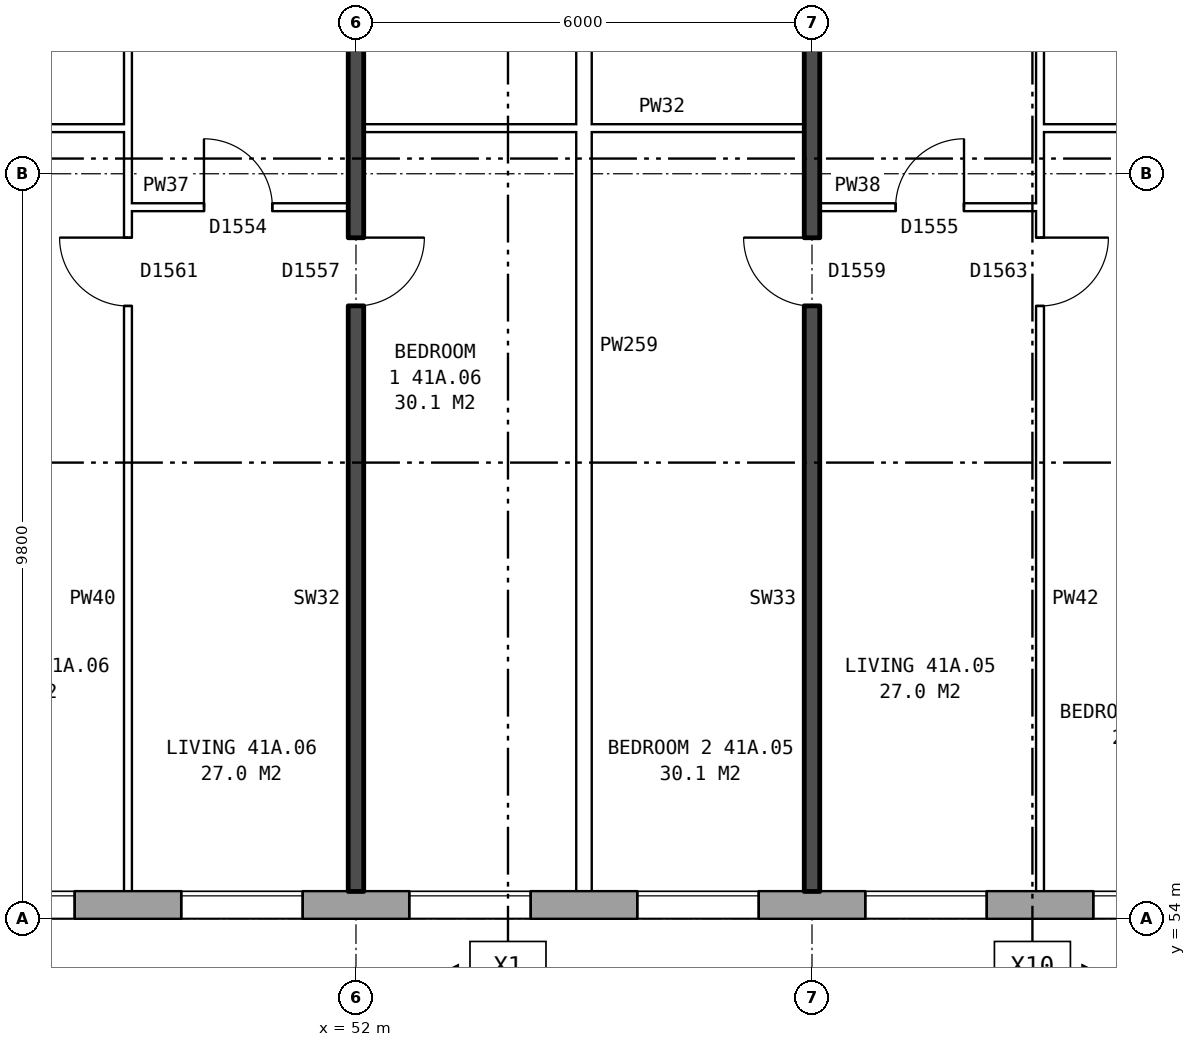
"""IFC4 building model, lengths in metres.
Left out: names, types, materials, properties, quantities, classifications, styles, units other than length and angle.
Written with IfcOpenShell. Run it as: python <this file> out.ifc"""

import sys

from ifc_helpers import new_model, si_unit, direction, frame, frame_2d, origin, place, context, subcontext, project, spatial, rectangle, extrude, element, fill, save


model = new_model("IFC4")
c1 = context("Model", 3, precision=1e-05, world=origin(), true_north=direction((0.0, 1.0)))
c2 = subcontext(c1, "Body", "Model", "MODEL_VIEW")
j1 = project(units=[si_unit("LENGTHUNIT", "METRE"), si_unit("PLANEANGLEUNIT", "RADIAN")], contexts=[c1])
p1 = place(None, origin())
s1 = spatial("IfcSite", under=j1, at=p1, CompositionType="ELEMENT")
p2 = place(p1, origin())
s2 = spatial("IfcBuilding", under=s1, at=p2, CompositionType="ELEMENT")
p3 = place(p2, frame((0.0, 0.0, 148.5)))
s3 = spatial("IfcBuildingStorey", under=s2, at=p3, CompositionType="ELEMENT", Elevation=148.5)
p4 = place(p3, frame((31.575, 54.18, 0.0), z_axis=(0.0, 0.0, 1.0), x_axis=(1.0, 0.0, 0.0)))
e1 = element("IfcWall", 1, at=p4, inside=s3, PredefinedType="STANDARD", context=c2, shape_type="SweptSolid", body=[
    extrude(rectangle(XDim=41.351, YDim=0.36, at=frame_2d((20.675, 0.0))), origin(), (0.0, 0.0, 1.0), 2.85),
])
p5 = place(p4, frame((3.125, 0.0, 0.8)))
e2 = element("IfcOpeningElement", 2, at=p5, cuts=e1, PredefinedType="OPENING", context=c2, shape_type="SweptSolid", body=[
    extrude(rectangle(XDim=1.6, YDim=1.8, at=frame_2d((0.8, 0.9))), frame((0.0, 0.19, 0.0), z_axis=(0.0, -1.0, 0.0), x_axis=(1.0, 0.0, 0.0)), (0.0, 0.0, 1.0), 0.38),
])
p6 = place(p4, frame((6.125, 0.0, 0.8)))
e3 = element("IfcOpeningElement", 3, at=p6, cuts=e1, PredefinedType="OPENING", context=c2, shape_type="SweptSolid", body=[
    extrude(rectangle(XDim=1.6, YDim=1.8, at=frame_2d((0.8, 0.9))), frame((0.0, 0.19, 0.0), z_axis=(0.0, -1.0, 0.0), x_axis=(1.0, 0.0, 0.0)), (0.0, 0.0, 1.0), 0.38),
])
p7 = place(p4, frame((9.125, 0.0, 0.8)))
e4 = element("IfcOpeningElement", 4, at=p7, cuts=e1, PredefinedType="OPENING", context=c2, shape_type="SweptSolid", body=[
    extrude(rectangle(XDim=1.6, YDim=1.8, at=frame_2d((0.8, 0.9))), frame((0.0, 0.19, 0.0), z_axis=(0.0, -1.0, 0.0), x_axis=(1.0, 0.0, 0.0)), (0.0, 0.0, 1.0), 0.38),
])
p8 = place(p4, frame((12.125, 0.0, 0.8)))
e5 = element("IfcOpeningElement", 5, at=p8, cuts=e1, PredefinedType="OPENING", context=c2, shape_type="SweptSolid", body=[
    extrude(rectangle(XDim=1.6, YDim=1.8, at=frame_2d((0.8, 0.9))), frame((0.0, 0.19, 0.0), z_axis=(0.0, -1.0, 0.0), x_axis=(1.0, 0.0, 0.0)), (0.0, 0.0, 1.0), 0.38),
])
p9 = place(p4, frame((15.125, 0.0, 0.8)))
e6 = element("IfcOpeningElement", 6, at=p9, cuts=e1, PredefinedType="OPENING", context=c2, shape_type="SweptSolid", body=[
    extrude(rectangle(XDim=1.6, YDim=1.8, at=frame_2d((0.8, 0.9))), frame((0.0, 0.19, 0.0), z_axis=(0.0, -1.0, 0.0), x_axis=(1.0, 0.0, 0.0)), (0.0, 0.0, 1.0), 0.38),
])
p10 = place(p4, frame((18.125, 0.0, 0.8)))
e7 = element("IfcOpeningElement", 7, at=p10, cuts=e1, PredefinedType="OPENING", context=c2, shape_type="SweptSolid", body=[
    extrude(rectangle(XDim=1.6, YDim=1.8, at=frame_2d((0.8, 0.9))), frame((0.0, 0.19, 0.0), z_axis=(0.0, -1.0, 0.0), x_axis=(1.0, 0.0, 0.0)), (0.0, 0.0, 1.0), 0.38),
])
p11 = place(p4, frame((21.125, 0.0, 0.8)))
e8 = element("IfcOpeningElement", 8, at=p11, cuts=e1, PredefinedType="OPENING", context=c2, shape_type="SweptSolid", body=[
    extrude(rectangle(XDim=1.6, YDim=1.8, at=frame_2d((0.8, 0.9))), frame((0.0, 0.19, 0.0), z_axis=(0.0, -1.0, 0.0), x_axis=(1.0, 0.0, 0.0)), (0.0, 0.0, 1.0), 0.38),
])
p12 = place(p4, frame((24.125, 0.0, 0.8)))
e9 = element("IfcOpeningElement", 9, at=p12, cuts=e1, PredefinedType="OPENING", context=c2, shape_type="SweptSolid", body=[
    extrude(rectangle(XDim=1.6, YDim=1.8, at=frame_2d((0.8, 0.9))), frame((0.0, 0.19, 0.0), z_axis=(0.0, -1.0, 0.0), x_axis=(1.0, 0.0, 0.0)), (0.0, 0.0, 1.0), 0.38),
])
p13 = place(p4, frame((27.125, 0.0, 0.8)))
e10 = element("IfcOpeningElement", 10, at=p13, cuts=e1, PredefinedType="OPENING", context=c2, shape_type="SweptSolid", body=[
    extrude(rectangle(XDim=1.6, YDim=1.8, at=frame_2d((0.8, 0.9))), frame((0.0, 0.19, 0.0), z_axis=(0.0, -1.0, 0.0), x_axis=(1.0, 0.0, 0.0)), (0.0, 0.0, 1.0), 0.38),
])
p14 = place(p4, frame((30.125, 0.0, 0.8)))
e11 = element("IfcOpeningElement", 11, at=p14, cuts=e1, PredefinedType="OPENING", context=c2, shape_type="SweptSolid", body=[
    extrude(rectangle(XDim=1.6, YDim=1.8, at=frame_2d((0.8, 0.9))), frame((0.0, 0.19, 0.0), z_axis=(0.0, -1.0, 0.0), x_axis=(1.0, 0.0, 0.0)), (0.0, 0.0, 1.0), 0.38),
])
p15 = place(p4, frame((33.125, 0.0, 0.8)))
e12 = element("IfcOpeningElement", 12, at=p15, cuts=e1, PredefinedType="OPENING", context=c2, shape_type="SweptSolid", body=[
    extrude(rectangle(XDim=1.6, YDim=1.8, at=frame_2d((0.8, 0.9))), frame((0.0, 0.19, 0.0), z_axis=(0.0, -1.0, 0.0), x_axis=(1.0, 0.0, 0.0)), (0.0, 0.0, 1.0), 0.38),
])
p16 = place(p4, frame((36.125, 0.0, 0.8)))
e13 = element("IfcOpeningElement", 13, at=p16, cuts=e1, PredefinedType="OPENING", context=c2, shape_type="SweptSolid", body=[
    extrude(rectangle(XDim=1.6, YDim=1.8, at=frame_2d((0.8, 0.9))), frame((0.0, 0.19, 0.0), z_axis=(0.0, -1.0, 0.0), x_axis=(1.0, 0.0, 0.0)), (0.0, 0.0, 1.0), 0.38),
])
p17 = place(p4, frame((38.625, 0.0, 0.8)))
e14 = element("IfcOpeningElement", 14, at=p17, cuts=e1, PredefinedType="OPENING", context=c2, shape_type="SweptSolid", body=[
    extrude(rectangle(XDim=1.2, YDim=1.8, at=frame_2d((0.6, 0.9))), frame((0.0, 0.19, 0.0), z_axis=(0.0, -1.0, 0.0), x_axis=(1.0, 0.0, 0.0)), (0.0, 0.0, 1.0), 0.38),
])
p18 = place(p4, frame((40.125, 0.0, 0.8)))
e15 = element("IfcOpeningElement", 15, at=p18, cuts=e1, PredefinedType="OPENING", context=c2, shape_type="SweptSolid", body=[
    extrude(rectangle(XDim=0.8, YDim=0.9, at=frame_2d((0.4, 0.45))), frame((0.0, 0.19, 0.0), z_axis=(0.0, -1.0, 0.0), x_axis=(1.0, 0.0, 0.0)), (0.0, 0.0, 1.0), 0.38),
])
p19 = place(p3, frame((49.0, 63.36, 0.0), z_axis=(0.0, 0.0, 1.0), x_axis=(1.0, 0.0, 0.0)))
e16 = element("IfcWall", 16, at=p19, inside=s3, PredefinedType="PARTITIONING", context=c2, shape_type="SweptSolid", body=[
    extrude(rectangle(XDim=2.9, YDim=0.1, at=frame_2d((1.45, 0.0))), origin(), (0.0, 0.0, 1.0), 2.85),
])
p20 = place(p19, frame((1.0, 0.0, 0.0)))
e17 = element("IfcOpeningElement", 17, at=p20, cuts=e16, PredefinedType="OPENING", context=c2, shape_type="SweptSolid", body=[
    extrude(rectangle(XDim=0.9, YDim=2.1, at=frame_2d((0.45, 1.05))), frame((0.0, 0.06, 0.0), z_axis=(0.0, -1.0, 0.0), x_axis=(1.0, 0.0, 0.0)), (0.0, 0.0, 1.0), 0.12),
])
p21 = place(p3, frame((58.1, 63.36, 0.0), z_axis=(0.0, 0.0, 1.0), x_axis=(1.0, 0.0, 0.0)))
e18 = element("IfcWall", 18, at=p21, inside=s3, PredefinedType="PARTITIONING", context=c2, shape_type="SweptSolid", body=[
    extrude(rectangle(XDim=2.9, YDim=0.1, at=frame_2d((1.45, 0.0))), origin(), (0.0, 0.0, 1.0), 2.85),
])
p22 = place(p21, frame((1.0, 0.0, 0.0)))
e19 = element("IfcOpeningElement", 19, at=p22, cuts=e18, PredefinedType="OPENING", context=c2, shape_type="SweptSolid", body=[
    extrude(rectangle(XDim=0.9, YDim=2.1, at=frame_2d((0.45, 1.05))), frame((0.0, 0.06, 0.0), z_axis=(0.0, -1.0, 0.0), x_axis=(1.0, 0.0, 0.0)), (0.0, 0.0, 1.0), 0.12),
])
p23 = place(p3, frame((46.1, 64.4, 0.0), z_axis=(0.0, 0.0, 1.0), x_axis=(1.0, 0.0, 0.0)))
e20 = element("IfcWall", 20, at=p23, inside=s3, PredefinedType="PARTITIONING", context=c2, shape_type="SweptSolid", body=[
    extrude(rectangle(XDim=2.9, YDim=0.1, at=frame_2d((1.45, 0.0))), origin(), (0.0, 0.0, 1.0), 2.85),
])
p24 = place(p3, frame((52.1, 64.4, 0.0), z_axis=(0.0, 0.0, 1.0), x_axis=(1.0, 0.0, 0.0)))
e21 = element("IfcWall", 21, at=p24, inside=s3, PredefinedType="PARTITIONING", context=c2, shape_type="SweptSolid", body=[
    extrude(rectangle(XDim=5.8, YDim=0.1, at=frame_2d((2.9, 0.0))), origin(), (0.0, 0.0, 1.0), 2.85),
])
p25 = place(p3, frame((61.0, 64.4, 0.0), z_axis=(0.0, 0.0, 1.0), x_axis=(1.0, 0.0, 0.0)))
e22 = element("IfcWall", 22, at=p25, inside=s3, PredefinedType="PARTITIONING", context=c2, shape_type="SweptSolid", body=[
    extrude(rectangle(XDim=2.64, YDim=0.1, at=frame_2d((1.32, 0.0))), origin(), (0.0, 0.0, 1.0), 2.85),
])
p26 = place(p3, frame((49.0, 54.36, 0.0), z_axis=(0.0, 0.0, 1.0), x_axis=(0.0, 1.0, 0.0)))
e23 = element("IfcWall", 23, at=p26, inside=s3, PredefinedType="PARTITIONING", context=c2, shape_type="SweptSolid", body=[
    extrude(rectangle(XDim=14.34, YDim=0.1, at=frame_2d((7.17, 0.0))), origin(), (0.0, 0.0, 1.0), 2.85),
])
p27 = place(p26, frame((7.7, 0.0, 0.0)))
e24 = element("IfcOpeningElement", 24, at=p27, cuts=e23, PredefinedType="OPENING", context=c2, shape_type="SweptSolid", body=[
    extrude(rectangle(XDim=0.9, YDim=2.1, at=frame_2d((0.45, 1.05))), frame((0.0, 0.06, 0.0), z_axis=(0.0, -1.0, 0.0), x_axis=(1.0, 0.0, 0.0)), (0.0, 0.0, 1.0), 0.12),
])
p28 = place(p26, frame((13.04, 0.0, 0.0)))
e25 = element("IfcOpeningElement", 25, at=p28, cuts=e23, PredefinedType="OPENING", context=c2, shape_type="SweptSolid", body=[
    extrude(rectangle(XDim=0.9, YDim=2.1, at=frame_2d((0.45, 1.05))), frame((0.0, 0.06, 0.0), z_axis=(0.0, -1.0, 0.0), x_axis=(1.0, 0.0, 0.0)), (0.0, 0.0, 1.0), 0.12),
])
p29 = place(p3, frame((52.0, 54.36, 0.0), z_axis=(0.0, 0.0, 1.0), x_axis=(0.0, 1.0, 0.0)))
e26 = element("IfcWall", 26, at=p29, inside=s3, PredefinedType="SOLIDWALL", context=c2, shape_type="SweptSolid", body=[
    extrude(rectangle(XDim=14.44, YDim=0.2, at=frame_2d((7.22, 0.0))), origin(), (0.0, 0.0, 1.0), 2.85),
])
p30 = place(p29, frame((7.7, 0.0, 0.0)))
e27 = element("IfcOpeningElement", 27, at=p30, cuts=e26, PredefinedType="OPENING", context=c2, shape_type="SweptSolid", body=[
    extrude(rectangle(XDim=0.9, YDim=2.1, at=frame_2d((0.45, 1.05))), frame((0.0, 0.11, 0.0), z_axis=(0.0, -1.0, 0.0), x_axis=(1.0, 0.0, 0.0)), (0.0, 0.0, 1.0), 0.22),
])
p31 = place(p29, frame((13.14, 0.0, 0.0)))
e28 = element("IfcOpeningElement", 28, at=p31, cuts=e26, PredefinedType="OPENING", context=c2, shape_type="SweptSolid", body=[
    extrude(rectangle(XDim=0.9, YDim=2.1, at=frame_2d((0.45, 1.05))), frame((0.0, 0.11, 0.0), z_axis=(0.0, -1.0, 0.0), x_axis=(1.0, 0.0, 0.0)), (0.0, 0.0, 1.0), 0.22),
])
p32 = place(p3, frame((55.0, 54.36, 0.0), z_axis=(0.0, 0.0, 1.0), x_axis=(0.0, 1.0, 0.0)))
e29 = element("IfcWall", 29, at=p32, inside=s3, PredefinedType="PARTITIONING", context=c2, shape_type="SweptSolid", body=[
    extrude(rectangle(XDim=14.34, YDim=0.2, at=frame_2d((7.17, 0.0))), origin(), (0.0, 0.0, 1.0), 2.85),
])
p33 = place(p3, frame((58.0, 54.36, 0.0), z_axis=(0.0, 0.0, 1.0), x_axis=(0.0, 1.0, 0.0)))
e30 = element("IfcWall", 30, at=p33, inside=s3, PredefinedType="SOLIDWALL", context=c2, shape_type="SweptSolid", body=[
    extrude(rectangle(XDim=14.44, YDim=0.2, at=frame_2d((7.22, 0.0))), origin(), (0.0, 0.0, 1.0), 2.85),
])
p34 = place(p33, frame((7.7, 0.0, 0.0)))
e31 = element("IfcOpeningElement", 31, at=p34, cuts=e30, PredefinedType="OPENING", context=c2, shape_type="SweptSolid", body=[
    extrude(rectangle(XDim=0.9, YDim=2.1, at=frame_2d((0.45, 1.05))), frame((0.0, 0.11, 0.0), z_axis=(0.0, -1.0, 0.0), x_axis=(1.0, 0.0, 0.0)), (0.0, 0.0, 1.0), 0.22),
])
p35 = place(p33, frame((13.14, 0.0, 0.0)))
e32 = element("IfcOpeningElement", 32, at=p35, cuts=e30, PredefinedType="OPENING", context=c2, shape_type="SweptSolid", body=[
    extrude(rectangle(XDim=0.9, YDim=2.1, at=frame_2d((0.45, 1.05))), frame((0.0, 0.11, 0.0), z_axis=(0.0, -1.0, 0.0), x_axis=(1.0, 0.0, 0.0)), (0.0, 0.0, 1.0), 0.22),
])
p36 = place(p3, frame((61.0, 54.36, 0.0), z_axis=(0.0, 0.0, 1.0), x_axis=(0.0, 1.0, 0.0)))
e33 = element("IfcWall", 33, at=p36, inside=s3, PredefinedType="PARTITIONING", context=c2, shape_type="SweptSolid", body=[
    extrude(rectangle(XDim=14.34, YDim=0.1, at=frame_2d((7.17, 0.0))), origin(), (0.0, 0.0, 1.0), 2.85),
])
p37 = place(p36, frame((7.7, 0.0, 0.0)))
e34 = element("IfcOpeningElement", 34, at=p37, cuts=e33, PredefinedType="OPENING", context=c2, shape_type="SweptSolid", body=[
    extrude(rectangle(XDim=0.9, YDim=2.1, at=frame_2d((0.45, 1.05))), frame((0.0, 0.06, 0.0), z_axis=(0.0, -1.0, 0.0), x_axis=(1.0, 0.0, 0.0)), (0.0, 0.0, 1.0), 0.12),
])
p38 = place(p36, frame((13.04, 0.0, 0.0)))
e35 = element("IfcOpeningElement", 35, at=p38, cuts=e33, PredefinedType="OPENING", context=c2, shape_type="SweptSolid", body=[
    extrude(rectangle(XDim=0.9, YDim=2.1, at=frame_2d((0.45, 1.05))), frame((0.0, 0.06, 0.0), z_axis=(0.0, -1.0, 0.0), x_axis=(1.0, 0.0, 0.0)), (0.0, 0.0, 1.0), 0.12),
])
p39 = place(p9, origin())
e36 = element("IfcWindow", 36, at=p39, inside=s3, PartitioningType="SINGLE_PANEL", PredefinedType="WINDOW", context=c2, shape_type="SweptSolid", body=[
    extrude(rectangle(XDim=1.6, YDim=1.8, at=frame_2d((0.8, 0.9))), frame((0.0, 0.15, 0.0), z_axis=(0.0, -1.0, 0.0), x_axis=(1.0, 0.0, 0.0)), (0.0, 0.0, 1.0), 0.06),
])
fill(e6, e36)
p40 = place(p10, origin())
e37 = element("IfcWindow", 37, at=p40, inside=s3, PartitioningType="SINGLE_PANEL", PredefinedType="WINDOW", context=c2, shape_type="SweptSolid", body=[
    extrude(rectangle(XDim=1.6, YDim=1.8, at=frame_2d((0.8, 0.9))), frame((0.0, 0.15, 0.0), z_axis=(0.0, -1.0, 0.0), x_axis=(1.0, 0.0, 0.0)), (0.0, 0.0, 1.0), 0.06),
])
fill(e7, e37)
p41 = place(p11, origin())
e38 = element("IfcWindow", 38, at=p41, inside=s3, PartitioningType="SINGLE_PANEL", PredefinedType="WINDOW", context=c2, shape_type="SweptSolid", body=[
    extrude(rectangle(XDim=1.6, YDim=1.8, at=frame_2d((0.8, 0.9))), frame((0.0, 0.15, 0.0), z_axis=(0.0, -1.0, 0.0), x_axis=(1.0, 0.0, 0.0)), (0.0, 0.0, 1.0), 0.06),
])
fill(e8, e38)
p42 = place(p12, origin())
e39 = element("IfcWindow", 39, at=p42, inside=s3, PartitioningType="SINGLE_PANEL", PredefinedType="WINDOW", context=c2, shape_type="SweptSolid", body=[
    extrude(rectangle(XDim=1.6, YDim=1.8, at=frame_2d((0.8, 0.9))), frame((0.0, 0.15, 0.0), z_axis=(0.0, -1.0, 0.0), x_axis=(1.0, 0.0, 0.0)), (0.0, 0.0, 1.0), 0.06),
])
fill(e9, e39)
p43 = place(p13, origin())
e40 = element("IfcWindow", 40, at=p43, inside=s3, PartitioningType="SINGLE_PANEL", PredefinedType="WINDOW", context=c2, shape_type="SweptSolid", body=[
    extrude(rectangle(XDim=1.6, YDim=1.8, at=frame_2d((0.8, 0.9))), frame((0.0, 0.15, 0.0), z_axis=(0.0, -1.0, 0.0), x_axis=(1.0, 0.0, 0.0)), (0.0, 0.0, 1.0), 0.06),
])
fill(e10, e40)
p44 = place(p14, origin())
e41 = element("IfcWindow", 41, at=p44, inside=s3, PartitioningType="SINGLE_PANEL", PredefinedType="WINDOW", context=c2, shape_type="SweptSolid", body=[
    extrude(rectangle(XDim=1.6, YDim=1.8, at=frame_2d((0.8, 0.9))), frame((0.0, 0.15, 0.0), z_axis=(0.0, -1.0, 0.0), x_axis=(1.0, 0.0, 0.0)), (0.0, 0.0, 1.0), 0.06),
])
fill(e11, e41)
p45 = place(p37, frame((0.9, 0.0, 0.0), z_axis=(0.0, 0.0, 1.0), x_axis=(-1.0, 0.0, 0.0)))
e42 = element("IfcDoor", 42, at=p45, inside=s3, OperationType="SINGLE_SWING_LEFT", PredefinedType="DOOR", context=c2, shape_type="SweptSolid", body=[
    extrude(rectangle(XDim=0.9, YDim=2.1, at=frame_2d((0.45, 1.05))), frame((0.0, 0.025, 0.0), z_axis=(0.0, -1.0, 0.0), x_axis=(1.0, 0.0, 0.0)), (0.0, 0.0, 1.0), 0.05),
])
fill(e34, e42)
p46 = place(p34, origin())
e43 = element("IfcDoor", 43, at=p46, inside=s3, OperationType="SINGLE_SWING_RIGHT", PredefinedType="DOOR", context=c2, shape_type="SweptSolid", body=[
    extrude(rectangle(XDim=0.9, YDim=2.1, at=frame_2d((0.45, 1.05))), frame((0.0, 0.025, 0.0), z_axis=(0.0, -1.0, 0.0), x_axis=(1.0, 0.0, 0.0)), (0.0, 0.0, 1.0), 0.05),
])
fill(e31, e43)
p47 = place(p22, origin())
e44 = element("IfcDoor", 44, at=p47, inside=s3, OperationType="SINGLE_SWING_RIGHT", PredefinedType="DOOR", context=c2, shape_type="SweptSolid", body=[
    extrude(rectangle(XDim=0.9, YDim=2.1, at=frame_2d((0.45, 1.05))), frame((0.0, 0.025, 0.0), z_axis=(0.0, -1.0, 0.0), x_axis=(1.0, 0.0, 0.0)), (0.0, 0.0, 1.0), 0.05),
])
fill(e19, e44)
p48 = place(p30, frame((0.9, 0.0, 0.0), z_axis=(0.0, 0.0, 1.0), x_axis=(-1.0, 0.0, 0.0)))
e45 = element("IfcDoor", 45, at=p48, inside=s3, OperationType="SINGLE_SWING_LEFT", PredefinedType="DOOR", context=c2, shape_type="SweptSolid", body=[
    extrude(rectangle(XDim=0.9, YDim=2.1, at=frame_2d((0.45, 1.05))), frame((0.0, 0.025, 0.0), z_axis=(0.0, -1.0, 0.0), x_axis=(1.0, 0.0, 0.0)), (0.0, 0.0, 1.0), 0.05),
])
fill(e27, e45)
p49 = place(p27, origin())
e46 = element("IfcDoor", 46, at=p49, inside=s3, OperationType="SINGLE_SWING_RIGHT", PredefinedType="DOOR", context=c2, shape_type="SweptSolid", body=[
    extrude(rectangle(XDim=0.9, YDim=2.1, at=frame_2d((0.45, 1.05))), frame((0.0, 0.025, 0.0), z_axis=(0.0, -1.0, 0.0), x_axis=(1.0, 0.0, 0.0)), (0.0, 0.0, 1.0), 0.05),
])
fill(e24, e46)
p50 = place(p20, origin())
e47 = element("IfcDoor", 47, at=p50, inside=s3, OperationType="SINGLE_SWING_LEFT", PredefinedType="DOOR", context=c2, shape_type="SweptSolid", body=[
    extrude(rectangle(XDim=0.9, YDim=2.1, at=frame_2d((0.45, 1.05))), frame((0.0, 0.025, 0.0), z_axis=(0.0, -1.0, 0.0), x_axis=(1.0, 0.0, 0.0)), (0.0, 0.0, 1.0), 0.05),
])
fill(e17, e47)
save(model, sys.argv[1])
